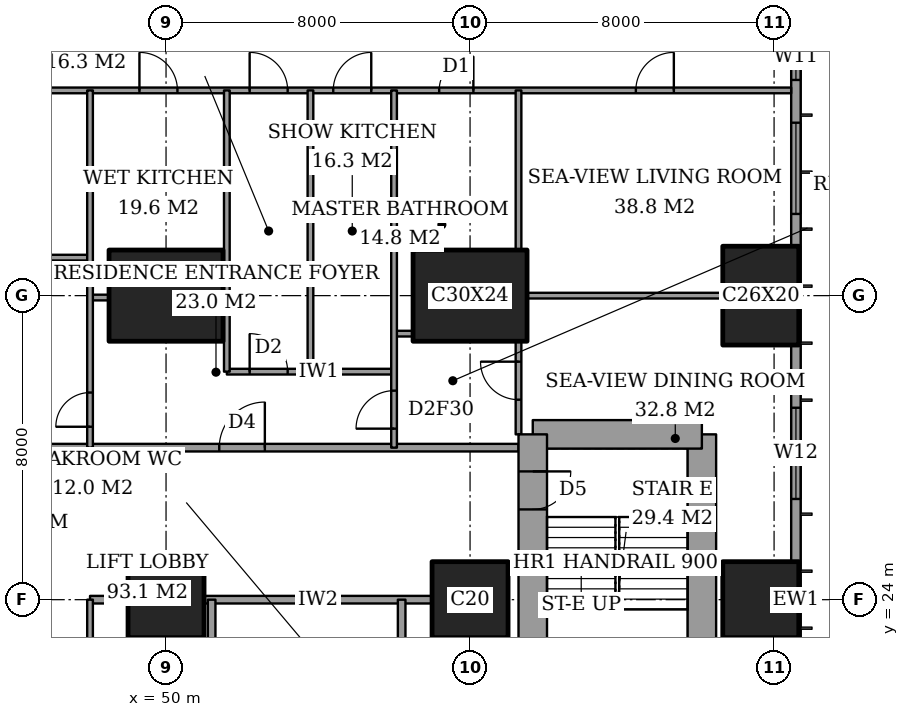
"""IFC4 building model, lengths in metres.
Left out: names, types, materials, properties, quantities, classifications, styles, units other than length and angle.
Written with IfcOpenShell. Run it as: python <this file> out.ifc"""

import sys

from ifc_helpers import new_model, si_unit, direction, frame, frame_2d, origin, origin_2d, place, context, subcontext, project, spatial, rectangle, extrude, element, fill, save


model = new_model("IFC4")
c1 = context("Model", 3, precision=1e-05, world=origin(), true_north=direction((0.0, 1.0)))
c2 = subcontext(c1, "Body", "Model", "MODEL_VIEW")
j1 = project(units=[si_unit("LENGTHUNIT", "METRE"), si_unit("PLANEANGLEUNIT", "RADIAN")], contexts=[c1])
p1 = place(None, origin())
s1 = spatial("IfcSite", under=j1, at=p1, CompositionType="ELEMENT")
p2 = place(p1, origin())
s2 = spatial("IfcBuilding", under=s1, at=p2, CompositionType="ELEMENT")
p3 = place(p2, frame((0.0, 0.0, 114.2)))
s3 = spatial("IfcBuildingStorey", under=s2, at=p3, CompositionType="ELEMENT", Elevation=114.2)
p4 = place(p3, frame((50.0, 24.0, 0.0), z_axis=(0.0, 0.0, 1.0), x_axis=(1.0, 0.0, 0.0)))
e1 = element("IfcColumn", 1, at=p4, inside=s3, PredefinedType="COLUMN", context=c2, shape_type="SweptSolid", body=[
    extrude(rectangle(XDim=2.0, YDim=2.0, at=origin_2d()), origin(), (0.0, 0.0, 1.0), 3.6),
])
p5 = place(p3, frame((50.0, 32.0, 0.0), z_axis=(0.0, 0.0, 1.0), x_axis=(1.0, 0.0, 0.0)))
e2 = element("IfcColumn", 2, at=p5, inside=s3, PredefinedType="COLUMN", context=c2, shape_type="SweptSolid", body=[
    extrude(rectangle(XDim=3.0, YDim=2.4, at=origin_2d()), origin(), (0.0, 0.0, 1.0), 3.6),
])
p6 = place(p3, frame((58.0, 24.0, 0.0), z_axis=(0.0, 0.0, 1.0), x_axis=(1.0, 0.0, 0.0)))
e3 = element("IfcColumn", 3, at=p6, inside=s3, PredefinedType="COLUMN", context=c2, shape_type="SweptSolid", body=[
    extrude(rectangle(XDim=2.0, YDim=2.0, at=origin_2d()), origin(), (0.0, 0.0, 1.0), 3.6),
])
p7 = place(p3, frame((58.0, 32.0, 0.0), z_axis=(0.0, 0.0, 1.0), x_axis=(1.0, 0.0, 0.0)))
e4 = element("IfcColumn", 4, at=p7, inside=s3, PredefinedType="COLUMN", context=c2, shape_type="SweptSolid", body=[
    extrude(rectangle(XDim=3.0, YDim=2.4, at=origin_2d()), origin(), (0.0, 0.0, 1.0), 3.6),
])
p8 = place(p3, frame((65.65, 24.0, 0.0), z_axis=(0.0, 0.0, 1.0), x_axis=(1.0, 0.0, 0.0)))
e5 = element("IfcColumn", 5, at=p8, inside=s3, PredefinedType="COLUMN", context=c2, shape_type="SweptSolid", body=[
    extrude(rectangle(XDim=2.0, YDim=2.0, at=origin_2d()), origin(), (0.0, 0.0, 1.0), 3.6),
])
p9 = place(p3, frame((65.65, 32.0, 0.0), z_axis=(0.0, 0.0, 1.0), x_axis=(0.0, 1.0, 0.0)))
e6 = element("IfcColumn", 6, at=p9, inside=s3, PredefinedType="COLUMN", context=c2, shape_type="SweptSolid", body=[
    extrude(rectangle(XDim=2.6, YDim=2.0, at=origin_2d()), origin(), (0.0, 0.0, 1.0), 3.6),
])
p10 = place(p3, frame((64.1, 19.65, 0.0), z_axis=(0.0, 0.0, 1.0), x_axis=(0.0, 1.0, 0.0)))
e7 = element("IfcWall", 7, at=p10, inside=s3, PredefinedType="SHEAR", context=c2, shape_type="SweptSolid", body=[
    extrude(rectangle(XDim=8.7, YDim=0.75, at=frame_2d((4.35, 0.0))), origin(), (0.0, 0.0, 1.0), 3.6),
])
p11 = place(p3, frame((64.1, 28.35, 0.0), z_axis=(0.0, 0.0, 1.0), x_axis=(-1.0, 0.0, 0.0)))
e8 = element("IfcWall", 8, at=p11, inside=s3, PredefinedType="SHEAR", context=c2, shape_type="SweptSolid", body=[
    extrude(rectangle(XDim=4.45, YDim=0.75, at=frame_2d((2.225, 0.0))), origin(), (0.0, 0.0, 1.0), 3.6),
])
p12 = place(p3, frame((59.65, 28.35, 0.0), z_axis=(0.0, 0.0, 1.0), x_axis=(0.0, -1.0, 0.0)))
e9 = element("IfcWall", 9, at=p12, inside=s3, PredefinedType="SHEAR", context=c2, shape_type="SweptSolid", body=[
    extrude(rectangle(XDim=8.7, YDim=0.75, at=frame_2d((4.35, 0.0))), origin(), (0.0, 0.0, 1.0), 3.6),
])
p13 = place(p12, frame((0.975, 0.0, 0.0)))
e10 = element("IfcOpeningElement", 10, at=p13, cuts=e9, PredefinedType="OPENING", context=c2, shape_type="SweptSolid", body=[
    extrude(rectangle(XDim=1.0, YDim=2.1, at=frame_2d((0.5, 1.05))), frame((0.0, 0.385, 0.0), z_axis=(0.0, -1.0, 0.0), x_axis=(1.0, 0.0, 0.0)), (0.0, 0.0, 1.0), 0.77),
])
p14 = place(p3, frame((66.575, 3.175, 0.0), z_axis=(0.0, 0.0, 1.0), x_axis=(0.0, 1.0, 0.0)))
e11 = element("IfcWall", 11, at=p14, inside=s3, PredefinedType="SOLIDWALL", context=c2, shape_type="SweptSolid", body=[
    extrude(rectangle(XDim=41.65, YDim=0.25, at=frame_2d((20.825, 0.0))), origin(), (0.0, 0.0, 1.0), 3.6),
])
p15 = place(p14, frame((0.775, 0.0, 0.4)))
e12 = element("IfcOpeningElement", 12, at=p15, cuts=e11, PredefinedType="OPENING", context=c2, shape_type="SweptSolid", body=[
    extrude(rectangle(XDim=2.4, YDim=2.2, at=frame_2d((1.2, 1.1))), frame((0.0, 0.135, 0.0), z_axis=(0.0, -1.0, 0.0), x_axis=(1.0, 0.0, 0.0)), (0.0, 0.0, 1.0), 0.27),
])
p16 = place(p14, frame((6.1, 0.0, 0.4)))
e13 = element("IfcOpeningElement", 13, at=p16, cuts=e11, PredefinedType="OPENING", context=c2, shape_type="SweptSolid", body=[
    extrude(rectangle(XDim=1.2, YDim=2.2, at=frame_2d((0.6, 1.1))), frame((0.0, 0.135, 0.0), z_axis=(0.0, -1.0, 0.0), x_axis=(1.0, 0.0, 0.0)), (0.0, 0.0, 1.0), 0.27),
])
p17 = place(p14, frame((8.275, 0.0, 0.4)))
e14 = element("IfcOpeningElement", 14, at=p17, cuts=e11, PredefinedType="OPENING", context=c2, shape_type="SweptSolid", body=[
    extrude(rectangle(XDim=2.4, YDim=2.2, at=frame_2d((1.2, 1.1))), frame((0.0, 0.135, 0.0), z_axis=(0.0, -1.0, 0.0), x_axis=(1.0, 0.0, 0.0)), (0.0, 0.0, 1.0), 0.27),
])
p18 = place(p14, frame((15.775, 0.0, 0.4)))
e15 = element("IfcOpeningElement", 15, at=p18, cuts=e11, PredefinedType="OPENING", context=c2, shape_type="SweptSolid", body=[
    extrude(rectangle(XDim=2.4, YDim=2.2, at=frame_2d((1.2, 1.1))), frame((0.0, 0.135, 0.0), z_axis=(0.0, -1.0, 0.0), x_axis=(1.0, 0.0, 0.0)), (0.0, 0.0, 1.0), 0.27),
])
p19 = place(p14, frame((23.475, 0.0, 0.4)))
e16 = element("IfcOpeningElement", 16, at=p19, cuts=e11, PredefinedType="OPENING", context=c2, shape_type="SweptSolid", body=[
    extrude(rectangle(XDim=2.4, YDim=2.2, at=frame_2d((1.2, 1.1))), frame((0.0, 0.135, 0.0), z_axis=(0.0, -1.0, 0.0), x_axis=(1.0, 0.0, 0.0)), (0.0, 0.0, 1.0), 0.27),
])
p20 = place(p14, frame((30.975, 0.0, 0.4)))
e17 = element("IfcOpeningElement", 17, at=p20, cuts=e11, PredefinedType="OPENING", context=c2, shape_type="SweptSolid", body=[
    extrude(rectangle(XDim=2.4, YDim=2.2, at=frame_2d((1.2, 1.1))), frame((0.0, 0.135, 0.0), z_axis=(0.0, -1.0, 0.0), x_axis=(1.0, 0.0, 0.0)), (0.0, 0.0, 1.0), 0.27),
])
p21 = place(p14, frame((34.5, 0.0, 0.4)))
e18 = element("IfcOpeningElement", 18, at=p21, cuts=e11, PredefinedType="OPENING", context=c2, shape_type="SweptSolid", body=[
    extrude(rectangle(XDim=1.2, YDim=2.2, at=frame_2d((0.6, 1.1))), frame((0.0, 0.135, 0.0), z_axis=(0.0, -1.0, 0.0), x_axis=(1.0, 0.0, 0.0)), (0.0, 0.0, 1.0), 0.27),
])
p22 = place(p14, frame((38.475, 0.0, 0.4)))
e19 = element("IfcOpeningElement", 19, at=p22, cuts=e11, PredefinedType="OPENING", context=c2, shape_type="SweptSolid", body=[
    extrude(rectangle(XDim=2.4, YDim=2.2, at=frame_2d((1.2, 1.1))), frame((0.0, 0.135, 0.0), z_axis=(0.0, -1.0, 0.0), x_axis=(1.0, 0.0, 0.0)), (0.0, 0.0, 1.0), 0.27),
])
p23 = place(p3, frame((48.0, 24.0, 0.0), z_axis=(0.0, 0.0, 1.0), x_axis=(1.0, 0.0, 0.0)))
e20 = element("IfcWall", 20, at=p23, inside=s3, PredefinedType="PARTITIONING", context=c2, shape_type="SweptSolid", body=[
    extrude(rectangle(XDim=1.0, YDim=0.2, at=frame_2d((0.5, 0.0))), origin(), (0.0, 0.0, 1.0), 3.35),
])
p24 = place(p3, frame((51.0, 24.0, 0.0), z_axis=(0.0, 0.0, 1.0), x_axis=(1.0, 0.0, 0.0)))
e21 = element("IfcWall", 21, at=p24, inside=s3, PredefinedType="PARTITIONING", context=c2, shape_type="SweptSolid", body=[
    extrude(rectangle(XDim=6.0, YDim=0.2, at=frame_2d((3.0, 0.0))), origin(), (0.0, 0.0, 1.0), 3.35),
])
p25 = place(p3, frame((42.0, 28.0, 0.0), z_axis=(0.0, 0.0, 1.0), x_axis=(1.0, 0.0, 0.0)))
e22 = element("IfcWall", 22, at=p25, inside=s3, PredefinedType="PARTITIONING", context=c2, shape_type="SweptSolid", body=[
    extrude(rectangle(XDim=17.275, YDim=0.2, at=frame_2d((8.637, 0.0))), origin(), (0.0, 0.0, 1.0), 3.35),
])
p26 = place(p25, frame((9.4, 0.0, 0.0)))
e23 = element("IfcOpeningElement", 23, at=p26, cuts=e22, PredefinedType="OPENING", context=c2, shape_type="SweptSolid", body=[
    extrude(rectangle(XDim=1.2, YDim=2.4, at=frame_2d((0.6, 1.2))), frame((0.0, 0.11, 0.0), z_axis=(0.0, -1.0, 0.0), x_axis=(1.0, 0.0, 0.0)), (0.0, 0.0, 1.0), 0.22),
])
p27 = place(p3, frame((51.6, 30.0, 0.0), z_axis=(0.0, 0.0, 1.0), x_axis=(1.0, 0.0, 0.0)))
e24 = element("IfcWall", 24, at=p27, inside=s3, PredefinedType="PARTITIONING", context=c2, shape_type="SweptSolid", body=[
    extrude(rectangle(XDim=4.4, YDim=0.15, at=frame_2d((2.2, 0.0))), origin(), (0.0, 0.0, 1.0), 3.35),
])
p28 = place(p27, frame((0.6, 0.0, 0.0)))
e25 = element("IfcOpeningElement", 25, at=p28, cuts=e24, PredefinedType="OPENING", context=c2, shape_type="SweptSolid", body=[
    extrude(rectangle(XDim=1.0, YDim=2.1, at=frame_2d((0.5, 1.05))), frame((0.0, 0.085, 0.0), z_axis=(0.0, -1.0, 0.0), x_axis=(1.0, 0.0, 0.0)), (0.0, 0.0, 1.0), 0.17),
])
p29 = place(p3, frame((56.0, 31.0, 0.0), z_axis=(0.0, 0.0, 1.0), x_axis=(1.0, 0.0, 0.0)))
e26 = element("IfcWall", 26, at=p29, inside=s3, PredefinedType="PARTITIONING", context=c2, shape_type="SweptSolid", body=[
    extrude(rectangle(XDim=0.5, YDim=0.15, at=frame_2d((0.25, 0.0))), origin(), (0.0, 0.0, 1.0), 3.35),
])
p30 = place(p3, frame((48.0, 31.95, 0.0), z_axis=(0.0, 0.0, 1.0), x_axis=(1.0, 0.0, 0.0)))
e27 = element("IfcWall", 27, at=p30, inside=s3, PredefinedType="PARTITIONING", context=c2, shape_type="SweptSolid", body=[
    extrude(rectangle(XDim=0.5, YDim=0.15, at=frame_2d((0.25, 0.0))), origin(), (0.0, 0.0, 1.0), 2.634),
])
p31 = place(p3, frame((59.5, 32.0, 0.0), z_axis=(0.0, 0.0, 1.0), x_axis=(1.0, 0.0, 0.0)))
e28 = element("IfcWall", 28, at=p31, inside=s3, PredefinedType="PARTITIONING", context=c2, shape_type="SweptSolid", body=[
    extrude(rectangle(XDim=5.15, YDim=0.15, at=frame_2d((2.575, 0.0))), origin(), (0.0, 0.0, 1.0), 2.634),
])
p32 = place(p3, frame((42.0, 33.0, 0.0), z_axis=(0.0, 0.0, 1.0), x_axis=(1.0, 0.0, 0.0)))
e29 = element("IfcWall", 29, at=p32, inside=s3, PredefinedType="PARTITIONING", context=c2, shape_type="SweptSolid", body=[
    extrude(rectangle(XDim=6.0, YDim=0.15, at=frame_2d((3.0, 0.0))), origin(), (0.0, 0.0, 1.0), 3.35),
])
p33 = place(p3, frame((41.439, 37.4, 0.0), z_axis=(0.0, 0.0, 1.0), x_axis=(1.0, 0.0, 0.0)))
e30 = element("IfcWall", 30, at=p33, inside=s3, PredefinedType="PARTITIONING", context=c2, shape_type="SweptSolid", body=[
    extrude(rectangle(XDim=25.011, YDim=0.15, at=frame_2d((12.505, 0.0))), origin(), (0.0, 0.0, 1.0), 3.35),
])
p34 = place(p33, frame((10.761, 0.0, 0.0)))
e31 = element("IfcOpeningElement", 31, at=p34, cuts=e30, PredefinedType="OPENING", context=c2, shape_type="SweptSolid", body=[
    extrude(rectangle(XDim=1.0, YDim=2.1, at=frame_2d((0.5, 1.05))), frame((0.0, 0.085, 0.0), z_axis=(0.0, -1.0, 0.0), x_axis=(1.0, 0.0, 0.0)), (0.0, 0.0, 1.0), 0.17),
])
p35 = place(p33, frame((20.924, 0.0, 0.0)))
e32 = element("IfcOpeningElement", 32, at=p35, cuts=e30, PredefinedType="OPENING", context=c2, shape_type="SweptSolid", body=[
    extrude(rectangle(XDim=1.0, YDim=2.1, at=frame_2d((0.5, 1.05))), frame((0.0, 0.085, 0.0), z_axis=(0.0, -1.0, 0.0), x_axis=(1.0, 0.0, 0.0)), (0.0, 0.0, 1.0), 0.17),
])
p36 = place(p33, frame((15.749, 0.0, 0.0)))
e33 = element("IfcOpeningElement", 33, at=p36, cuts=e30, PredefinedType="OPENING", context=c2, shape_type="SweptSolid", body=[
    extrude(rectangle(XDim=0.9, YDim=2.1, at=frame_2d((0.45, 1.05))), frame((0.0, 0.085, 0.0), z_axis=(0.0, -1.0, 0.0), x_axis=(1.0, 0.0, 0.0)), (0.0, 0.0, 1.0), 0.17),
])
p37 = place(p33, frame((12.961, 0.0, 0.0)))
e34 = element("IfcOpeningElement", 34, at=p37, cuts=e30, PredefinedType="OPENING", context=c2, shape_type="SweptSolid", body=[
    extrude(rectangle(XDim=1.0, YDim=2.1, at=frame_2d((0.5, 1.05))), frame((0.0, 0.085, 0.0), z_axis=(0.0, -1.0, 0.0), x_axis=(1.0, 0.0, 0.0)), (0.0, 0.0, 1.0), 0.17),
])
p38 = place(p33, frame((7.861, 0.0, 0.0)))
e35 = element("IfcOpeningElement", 35, at=p38, cuts=e30, PredefinedType="OPENING", context=c2, shape_type="SweptSolid", body=[
    extrude(rectangle(XDim=1.0, YDim=2.1, at=frame_2d((0.5, 1.05))), frame((0.0, 0.085, 0.0), z_axis=(0.0, -1.0, 0.0), x_axis=(1.0, 0.0, 0.0)), (0.0, 0.0, 1.0), 0.17),
])
p39 = place(p33, frame((2.836, 0.0, 0.0)))
e36 = element("IfcOpeningElement", 36, at=p39, cuts=e30, PredefinedType="OPENING", context=c2, shape_type="SweptSolid", body=[
    extrude(rectangle(XDim=1.0, YDim=2.1, at=frame_2d((0.5, 1.05))), frame((0.0, 0.085, 0.0), z_axis=(0.0, -1.0, 0.0), x_axis=(1.0, 0.0, 0.0)), (0.0, 0.0, 1.0), 0.17),
])
p40 = place(p3, frame((48.0, 10.6, 0.0), z_axis=(0.0, 0.0, 1.0), x_axis=(0.0, 1.0, 0.0)))
e37 = element("IfcWall", 37, at=p40, inside=s3, PredefinedType="PARTITIONING", context=c2, shape_type="SweptSolid", body=[
    extrude(rectangle(XDim=13.4, YDim=0.15, at=frame_2d((6.7, 0.0))), origin(), (0.0, 0.0, 1.0), 3.35),
])
p41 = place(p40, frame((10.8, 0.0, 0.0)))
e38 = element("IfcOpeningElement", 38, at=p41, cuts=e37, PredefinedType="OPENING", context=c2, shape_type="SweptSolid", body=[
    extrude(rectangle(XDim=1.2, YDim=2.4, at=frame_2d((0.6, 1.2))), frame((0.0, 0.085, 0.0), z_axis=(0.0, -1.0, 0.0), x_axis=(1.0, 0.0, 0.0)), (0.0, 0.0, 1.0), 0.17),
])
p42 = place(p40, frame((6.7, 0.0, 0.0)))
e39 = element("IfcOpeningElement", 39, at=p42, cuts=e37, PredefinedType="OPENING", context=c2, shape_type="SweptSolid", body=[
    extrude(rectangle(XDim=0.9, YDim=2.1, at=frame_2d((0.45, 1.05))), frame((0.0, 0.085, 0.0), z_axis=(0.0, -1.0, 0.0), x_axis=(1.0, 0.0, 0.0)), (0.0, 0.0, 1.0), 0.17),
])
p43 = place(p3, frame((48.0, 28.0, 0.0), z_axis=(0.0, 0.0, 1.0), x_axis=(0.0, 1.0, 0.0)))
e40 = element("IfcWall", 40, at=p43, inside=s3, PredefinedType="PARTITIONING", context=c2, shape_type="SweptSolid", body=[
    extrude(rectangle(XDim=9.4, YDim=0.15, at=frame_2d((4.7, 0.0))), origin(), (0.0, 0.0, 1.0), 3.35),
])
p44 = place(p43, frame((0.55, 0.0, 0.0)))
e41 = element("IfcOpeningElement", 41, at=p44, cuts=e40, PredefinedType="OPENING", context=c2, shape_type="SweptSolid", body=[
    extrude(rectangle(XDim=0.9, YDim=2.1, at=frame_2d((0.45, 1.05))), frame((0.0, 0.085, 0.0), z_axis=(0.0, -1.0, 0.0), x_axis=(1.0, 0.0, 0.0)), (0.0, 0.0, 1.0), 0.17),
])
p45 = place(p3, frame((51.2, 21.6, 0.0), z_axis=(0.0, 0.0, 1.0), x_axis=(0.0, 1.0, 0.0)))
e42 = element("IfcWall", 42, at=p45, inside=s3, PredefinedType="PARTITIONING", context=c2, shape_type="SweptSolid", body=[
    extrude(rectangle(XDim=2.4, YDim=0.2, at=frame_2d((1.2, 0.0))), origin(), (0.0, 0.0, 1.0), 3.35),
])
for number, where, z_axis, x_axis in (
    (43, (51.6, 30.0, 0.0), (0.0, 0.0, 1.0), (0.0, 1.0, 0.0)),
    (44, (53.8, 30.0, 0.0), (0.0, 0.0, 1.0), (0.0, 1.0, 0.0)),
):
    element("IfcWall", number, at=place(p3, frame(where, z_axis=z_axis, x_axis=x_axis)), inside=s3, PredefinedType="PARTITIONING", context=c2, shape_type="SweptSolid", body=[
        extrude(rectangle(XDim=7.4, YDim=0.15, at=frame_2d((3.7, 0.0))), origin(), (0.0, 0.0, 1.0), 3.35),
    ])
p46 = place(p3, frame((56.0, 28.0, 0.0), z_axis=(0.0, 0.0, 1.0), x_axis=(0.0, 1.0, 0.0)))
e45 = element("IfcWall", 45, at=p46, inside=s3, PredefinedType="PARTITIONING", context=c2, shape_type="SweptSolid", body=[
    extrude(rectangle(XDim=9.4, YDim=0.15, at=frame_2d((4.7, 0.0))), origin(), (0.0, 0.0, 1.0), 3.35),
])
p47 = place(p46, frame((0.5, 0.0, 0.0)))
e46 = element("IfcOpeningElement", 46, at=p47, cuts=e45, PredefinedType="OPENING", context=c2, shape_type="SweptSolid", body=[
    extrude(rectangle(XDim=1.0, YDim=2.1, at=frame_2d((0.5, 1.05))), frame((0.0, 0.085, 0.0), z_axis=(0.0, -1.0, 0.0), x_axis=(1.0, 0.0, 0.0)), (0.0, 0.0, 1.0), 0.17),
])
p48 = place(p3, frame((56.2, 21.6, 0.0), z_axis=(0.0, 0.0, 1.0), x_axis=(0.0, 1.0, 0.0)))
e47 = element("IfcWall", 47, at=p48, inside=s3, PredefinedType="PARTITIONING", context=c2, shape_type="SweptSolid", body=[
    extrude(rectangle(XDim=2.4, YDim=0.2, at=frame_2d((1.2, 0.0))), origin(), (0.0, 0.0, 1.0), 3.35),
])
p49 = place(p3, frame((59.275, 28.35, 0.0), z_axis=(0.0, 0.0, 1.0), x_axis=(0.0, 1.0, 0.0)))
e48 = element("IfcWall", 48, at=p49, inside=s3, PredefinedType="PARTITIONING", context=c2, shape_type="SweptSolid", body=[
    extrude(rectangle(XDim=2.45, YDim=0.15, at=frame_2d((1.225, 0.0))), origin(), (0.0, 0.0, 1.0), 3.35),
])
p50 = place(p49, frame((0.913, 0.0, 0.0)))
e49 = element("IfcOpeningElement", 49, at=p50, cuts=e48, PredefinedType="OPENING", context=c2, shape_type="SweptSolid", body=[
    extrude(rectangle(XDim=1.0, YDim=2.1, at=frame_2d((0.5, 1.05))), frame((0.0, 0.085, 0.0), z_axis=(0.0, -1.0, 0.0), x_axis=(1.0, 0.0, 0.0)), (0.0, 0.0, 1.0), 0.17),
])
p51 = place(p3, frame((59.275, 33.2, 0.0), z_axis=(0.0, 0.0, 1.0), x_axis=(0.0, 1.0, 0.0)))
e50 = element("IfcWall", 50, at=p51, inside=s3, PredefinedType="PARTITIONING", context=c2, shape_type="SweptSolid", body=[
    extrude(rectangle(XDim=4.2, YDim=0.15, at=frame_2d((2.1, 0.0))), origin(), (0.0, 0.0, 1.0), 3.35),
])
p52 = place(p19, origin())
e51 = element("IfcWindow", 51, at=p52, inside=s3, PartitioningType="SINGLE_PANEL", PredefinedType="WINDOW", context=c2, shape_type="SweptSolid", body=[
    extrude(rectangle(XDim=2.4, YDim=2.2, at=frame_2d((1.2, 1.1))), frame((0.0, 0.03, 0.0), z_axis=(0.0, -1.0, 0.0), x_axis=(1.0, 0.0, 0.0)), (0.0, 0.0, 1.0), 0.06),
])
fill(e16, e51)
p53 = place(p20, origin())
e52 = element("IfcWindow", 52, at=p53, inside=s3, PartitioningType="SINGLE_PANEL", PredefinedType="WINDOW", context=c2, shape_type="SweptSolid", body=[
    extrude(rectangle(XDim=2.4, YDim=2.2, at=frame_2d((1.2, 1.1))), frame((0.0, 0.03, 0.0), z_axis=(0.0, -1.0, 0.0), x_axis=(1.0, 0.0, 0.0)), (0.0, 0.0, 1.0), 0.06),
])
fill(e17, e52)
p54 = place(p21, origin())
e53 = element("IfcWindow", 53, at=p54, inside=s3, PartitioningType="SINGLE_PANEL", PredefinedType="WINDOW", context=c2, shape_type="SweptSolid", body=[
    extrude(rectangle(XDim=1.2, YDim=2.2, at=frame_2d((0.6, 1.1))), frame((0.0, 0.03, 0.0), z_axis=(0.0, -1.0, 0.0), x_axis=(1.0, 0.0, 0.0)), (0.0, 0.0, 1.0), 0.06),
])
fill(e18, e53)
p55 = place(p34, origin())
e54 = element("IfcDoor", 54, at=p55, inside=s3, OperationType="SINGLE_SWING_RIGHT", PredefinedType="DOOR", context=c2, shape_type="SweptSolid", body=[
    extrude(rectangle(XDim=1.0, YDim=2.1, at=frame_2d((0.5, 1.05))), frame((0.0, 0.025, 0.0), z_axis=(0.0, -1.0, 0.0), x_axis=(1.0, 0.0, 0.0)), (0.0, 0.0, 1.0), 0.05),
])
fill(e31, e54)
p56 = place(p35, origin())
e55 = element("IfcDoor", 55, at=p56, inside=s3, OperationType="SINGLE_SWING_LEFT", PredefinedType="DOOR", context=c2, shape_type="SweptSolid", body=[
    extrude(rectangle(XDim=1.0, YDim=2.1, at=frame_2d((0.5, 1.05))), frame((0.0, 0.025, 0.0), z_axis=(0.0, -1.0, 0.0), x_axis=(1.0, 0.0, 0.0)), (0.0, 0.0, 1.0), 0.05),
])
fill(e32, e55)
p57 = place(p50, origin())
e56 = element("IfcDoor", 56, at=p57, inside=s3, OperationType="SINGLE_SWING_LEFT", PredefinedType="DOOR", context=c2, shape_type="SweptSolid", body=[
    extrude(rectangle(XDim=1.0, YDim=2.1, at=frame_2d((0.5, 1.05))), frame((0.0, 0.025, 0.0), z_axis=(0.0, -1.0, 0.0), x_axis=(1.0, 0.0, 0.0)), (0.0, 0.0, 1.0), 0.05),
])
fill(e49, e56)
p58 = place(p36, origin())
e57 = element("IfcDoor", 57, at=p58, inside=s3, OperationType="SINGLE_SWING_LEFT", PredefinedType="DOOR", context=c2, shape_type="SweptSolid", body=[
    extrude(rectangle(XDim=0.9, YDim=2.1, at=frame_2d((0.45, 1.05))), frame((0.0, 0.025, 0.0), z_axis=(0.0, -1.0, 0.0), x_axis=(1.0, 0.0, 0.0)), (0.0, 0.0, 1.0), 0.05),
])
fill(e33, e57)
p59 = place(p47, origin())
e58 = element("IfcDoor", 58, at=p59, inside=s3, OperationType="SINGLE_SWING_RIGHT", PredefinedType="DOOR", context=c2, shape_type="SweptSolid", body=[
    extrude(rectangle(XDim=1.0, YDim=2.1, at=frame_2d((0.5, 1.05))), frame((0.0, 0.025, 0.0), z_axis=(0.0, -1.0, 0.0), x_axis=(1.0, 0.0, 0.0)), (0.0, 0.0, 1.0), 0.05),
])
fill(e46, e58)
p60 = place(p26, origin())
e59 = element("IfcDoor", 59, at=p60, inside=s3, OperationType="SINGLE_SWING_LEFT", PredefinedType="DOOR", context=c2, shape_type="SweptSolid", body=[
    extrude(rectangle(XDim=1.2, YDim=2.4, at=frame_2d((0.6, 1.2))), frame((0.0, 0.025, 0.0), z_axis=(0.0, -1.0, 0.0), x_axis=(1.0, 0.0, 0.0)), (0.0, 0.0, 1.0), 0.05),
])
fill(e23, e59)
p61 = place(p37, origin())
e60 = element("IfcDoor", 60, at=p61, inside=s3, OperationType="SINGLE_SWING_LEFT", PredefinedType="DOOR", context=c2, shape_type="SweptSolid", body=[
    extrude(rectangle(XDim=1.0, YDim=2.1, at=frame_2d((0.5, 1.05))), frame((0.0, 0.025, 0.0), z_axis=(0.0, -1.0, 0.0), x_axis=(1.0, 0.0, 0.0)), (0.0, 0.0, 1.0), 0.05),
])
fill(e34, e60)
p62 = place(p28, origin())
e61 = element("IfcDoor", 61, at=p62, inside=s3, OperationType="SINGLE_SWING_RIGHT", PredefinedType="DOOR", context=c2, shape_type="SweptSolid", body=[
    extrude(rectangle(XDim=1.0, YDim=2.1, at=frame_2d((0.5, 1.05))), frame((0.0, 0.025, 0.0), z_axis=(0.0, -1.0, 0.0), x_axis=(1.0, 0.0, 0.0)), (0.0, 0.0, 1.0), 0.05),
])
fill(e25, e61)
p63 = place(p38, origin())
e62 = element("IfcDoor", 62, at=p63, inside=s3, OperationType="SINGLE_SWING_RIGHT", PredefinedType="DOOR", context=c2, shape_type="SweptSolid", body=[
    extrude(rectangle(XDim=1.0, YDim=2.1, at=frame_2d((0.5, 1.05))), frame((0.0, 0.025, 0.0), z_axis=(0.0, -1.0, 0.0), x_axis=(1.0, 0.0, 0.0)), (0.0, 0.0, 1.0), 0.05),
])
fill(e35, e62)
p64 = place(p44, origin())
e63 = element("IfcDoor", 63, at=p64, inside=s3, OperationType="SINGLE_SWING_RIGHT", PredefinedType="DOOR", context=c2, shape_type="SweptSolid", body=[
    extrude(rectangle(XDim=0.9, YDim=2.1, at=frame_2d((0.45, 1.05))), frame((0.0, 0.025, 0.0), z_axis=(0.0, -1.0, 0.0), x_axis=(1.0, 0.0, 0.0)), (0.0, 0.0, 1.0), 0.05),
])
fill(e41, e63)
p65 = place(p13, origin())
e64 = element("IfcDoor", 64, at=p65, inside=s3, OperationType="SINGLE_SWING_RIGHT", PredefinedType="DOOR", context=c2, shape_type="SweptSolid", body=[
    extrude(rectangle(XDim=1.0, YDim=2.1, at=frame_2d((0.5, 1.05))), frame((0.0, 0.025, 0.0), z_axis=(0.0, -1.0, 0.0), x_axis=(1.0, 0.0, 0.0)), (0.0, 0.0, 1.0), 0.05),
])
fill(e10, e64)
save(model, sys.argv[1])
